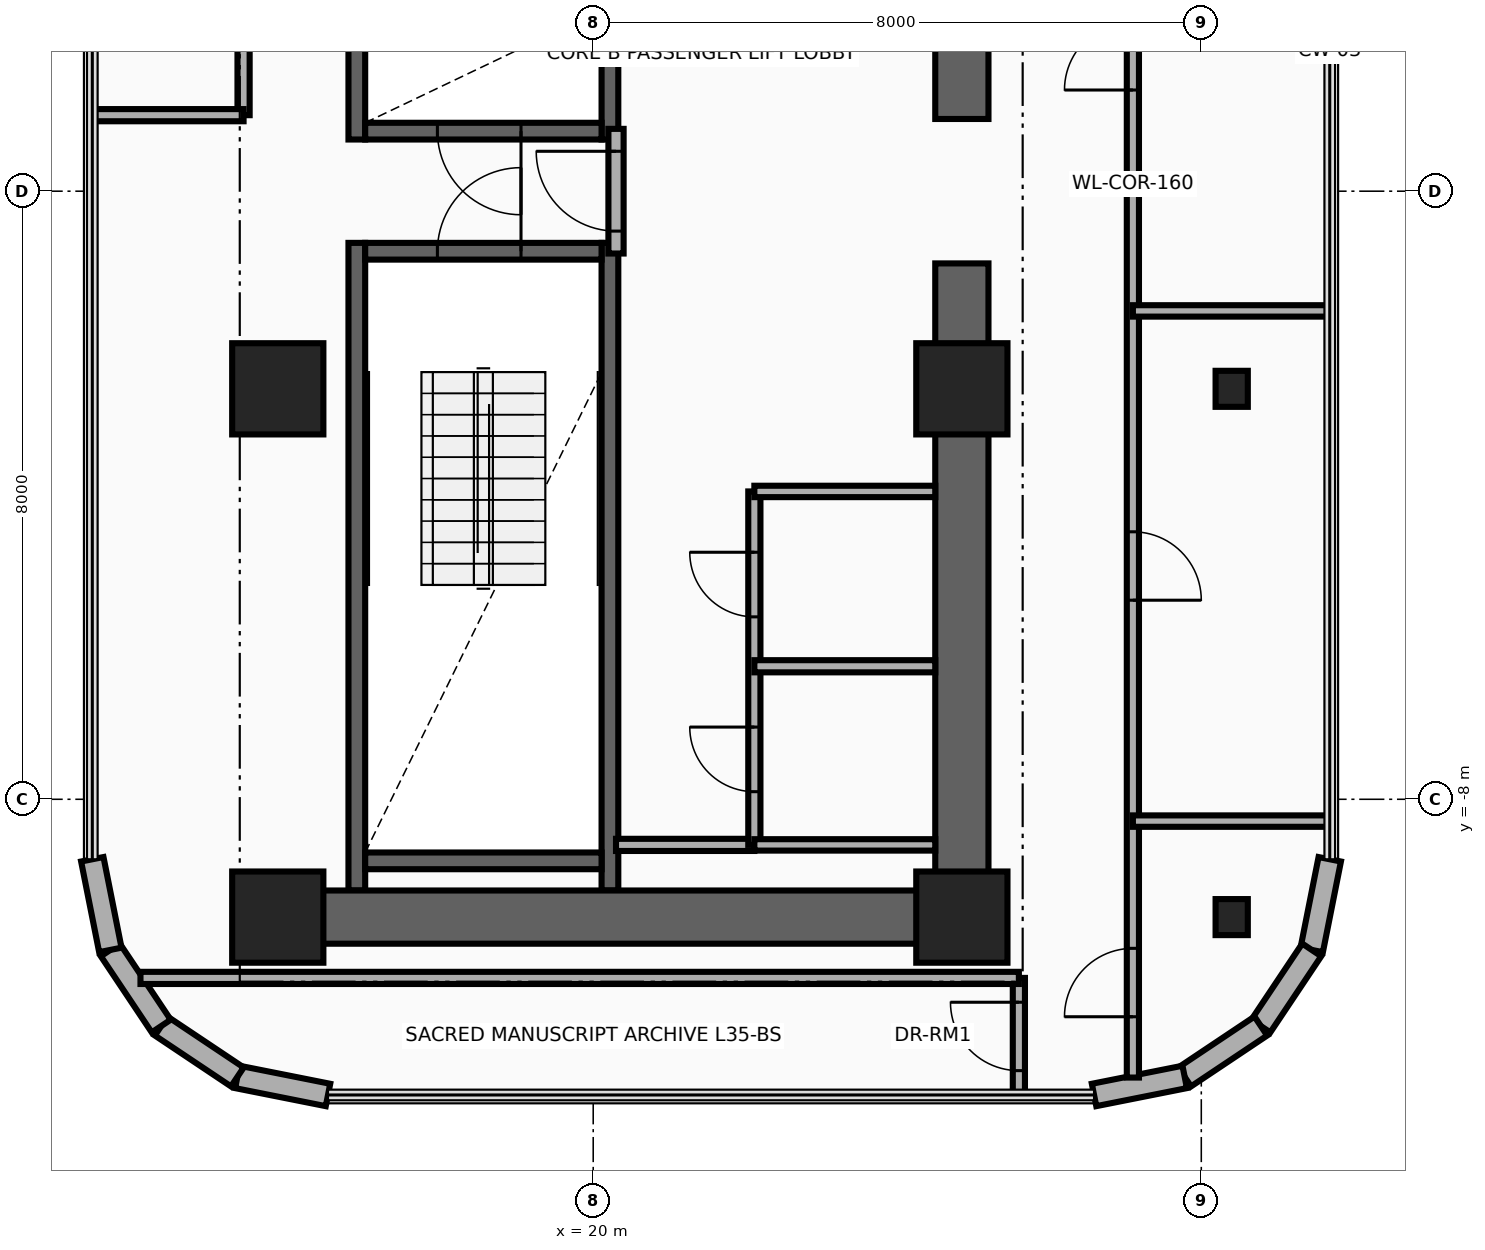
"""IFC4 building model, lengths in metres.
Left out: names, types, materials, properties, quantities, classifications, styles, units other than length and angle.
Written with IfcOpenShell. Run it as: python <this file> out.ifc"""

import sys

from ifc_helpers import new_model, si_unit, direction, frame, frame_2d, origin, origin_2d, place, context, subcontext, project, spatial, rectangle, i_section, extrude, source, transform, mapped, element, fill, save


model = new_model("IFC4")
c1 = context("Model", 3, precision=1e-05, world=origin(), true_north=direction((0.0, 1.0)))
c2 = subcontext(c1, "Body", "Model", "MODEL_VIEW")
j1 = project(units=[si_unit("LENGTHUNIT", "METRE"), si_unit("PLANEANGLEUNIT", "RADIAN")], contexts=[c1])
p1 = place(None, origin())
s1 = spatial("IfcSite", under=j1, at=p1, CompositionType="ELEMENT")
p2 = place(p1, origin())
s2 = spatial("IfcBuilding", under=s1, at=p2, CompositionType="ELEMENT")
p3 = place(p2, frame((0.0, 0.0, 139.0)))
s3 = spatial("IfcBuildingStorey", under=s2, at=p3, CompositionType="ELEMENT", Elevation=139.0)
for number, where, z_axis, x_axis in (
    (1, (16.89, 0.68, 0.0), (0.0, 0.0, 1.0), (0.0, 1.0, 0.0)),
    (2, (20.22, 0.68, 0.0), (0.0, 0.0, 1.0), (0.0, 1.0, 0.0)),
):
    element("IfcWall", number, at=place(p3, frame(where, z_axis=z_axis, x_axis=x_axis)), inside=s3, PredefinedType="SHEAR", context=c2, shape_type="SweptSolid", body=[
        extrude(rectangle(XDim=8.52, YDim=0.22, at=frame_2d((4.26, 0.0))), origin(), (0.0, 0.0, 1.0), 3.46),
    ])
p4 = place(p3, frame((17.0, 0.79, 0.0), z_axis=(0.0, 0.0, 1.0), x_axis=(1.0, 0.0, 0.0)))
e3 = element("IfcWall", 3, at=p4, inside=s3, PredefinedType="SHEAR", context=c2, shape_type="SweptSolid", body=[
    extrude(rectangle(XDim=3.11, YDim=0.22, at=frame_2d((1.555, 0.0))), origin(), (0.0, 0.0, 1.0), 3.46),
])
p5 = place(p4, frame((0.95, 0.0, 0.0)))
e4 = element("IfcOpeningElement", 4, at=p5, cuts=e3, PredefinedType="OPENING", context=c2, shape_type="SweptSolid", body=[
    extrude(rectangle(XDim=1.1, YDim=2.15, at=frame_2d((0.55, 1.075))), frame((0.0, 0.125, 0.0), z_axis=(0.0, -1.0, 0.0), x_axis=(1.0, 0.0, 0.0)), (0.0, 0.0, 1.0), 0.25),
])
for number, where, z_axis, x_axis in (
    (5, (16.89, -9.2, 0.0), (0.0, 0.0, 1.0), (0.0, 1.0, 0.0)),
    (6, (20.22, -9.2, 0.0), (0.0, 0.0, 1.0), (0.0, 1.0, 0.0)),
):
    element("IfcWall", number, at=place(p3, frame(where, z_axis=z_axis, x_axis=x_axis)), inside=s3, PredefinedType="SHEAR", context=c2, shape_type="SweptSolid", body=[
        extrude(rectangle(XDim=8.52, YDim=0.22, at=frame_2d((4.26, 0.0))), origin(), (0.0, 0.0, 1.0), 3.46),
    ])
p6 = place(p3, frame((17.0, -8.81, 0.0), z_axis=(0.0, 0.0, 1.0), x_axis=(1.0, 0.0, 0.0)))
e7 = element("IfcWall", 7, at=p6, inside=s3, PredefinedType="SHEAR", context=c2, shape_type="SweptSolid", body=[
    extrude(rectangle(XDim=3.11, YDim=0.22, at=frame_2d((1.555, 0.0))), origin(), (0.0, 0.0, 1.0), 3.46),
])
p7 = place(p3, frame((17.0, -0.79, 0.0), z_axis=(0.0, 0.0, 1.0), x_axis=(1.0, 0.0, 0.0)))
e8 = element("IfcWall", 8, at=p7, inside=s3, PredefinedType="SHEAR", context=c2, shape_type="SweptSolid", body=[
    extrude(rectangle(XDim=3.11, YDim=0.22, at=frame_2d((1.555, 0.0))), origin(), (0.0, 0.0, 1.0), 3.46),
])
p8 = place(p7, frame((0.95, 0.0, 0.0)))
e9 = element("IfcOpeningElement", 9, at=p8, cuts=e8, PredefinedType="OPENING", context=c2, shape_type="SweptSolid", body=[
    extrude(rectangle(XDim=1.1, YDim=2.15, at=frame_2d((0.55, 1.075))), frame((0.0, 0.125, 0.0), z_axis=(0.0, -1.0, 0.0), x_axis=(1.0, 0.0, 0.0)), (0.0, 0.0, 1.0), 0.25),
])
for number, where, z_axis, x_axis in (
    (10, (24.85, -9.9, 0.0), (0.0, 0.0, 1.0), (0.0, 1.0, 0.0)),
    (11, (24.85, 0.95, 0.0), (0.0, 0.0, 1.0), (0.0, 1.0, 0.0)),
):
    element("IfcWall", number, at=place(p3, frame(where, z_axis=z_axis, x_axis=x_axis)), inside=s3, PredefinedType="SHEAR", context=c2, shape_type="SweptSolid", body=[
        extrude(rectangle(XDim=8.95, YDim=0.7, at=frame_2d((4.475, 0.0))), origin(), (0.0, 0.0, 1.0), 3.46),
    ])
p9 = place(p3, frame((15.85, -9.55, 0.0), z_axis=(0.0, 0.0, 1.0), x_axis=(1.0, 0.0, 0.0)))
e12 = element("IfcWall", 12, at=p9, inside=s3, PredefinedType="SHEAR", context=c2, shape_type="SweptSolid", body=[
    extrude(rectangle(XDim=9.0, YDim=0.7, at=frame_2d((4.5, 0.0))), origin(), (0.0, 0.0, 1.0), 3.46),
])
m1 = source(origin(), c2, "Body", "SweptSolid", [
    extrude(rectangle(XDim=1.2, YDim=1.2, at=origin_2d()), origin(), (0.0, 0.0, 1.0), 3.7),
])
for number, where, z_axis, x_axis in (
    (13, (15.85, -9.55, 0.0), (0.0, 0.0, 1.0), (1.0, 0.0, 0.0)),
    (14, (24.85, -9.55, 0.0), (0.0, 0.0, 1.0), (1.0, 0.0, 0.0)),
):
    element("IfcColumn", number, at=place(p3, frame(where, z_axis=z_axis, x_axis=x_axis)), inside=s3, PredefinedType="COLUMN", context=c2, shape_type="MappedRepresentation", body=[
        mapped(m1, transform((0.0, 0.0, 0.0), x_axis=(1.0, 0.0, 0.0), y_axis=(0.0, 1.0, 0.0), z_axis=(0.0, 0.0, 1.0), scale=1.0)),
    ])
m2 = source(origin(), c2, "Body", "SweptSolid", [
    extrude(i_section(OverallWidth=0.424, OverallDepth=0.474, WebThickness=0.048, FlangeThickness=0.077, at=origin_2d()), origin(), (0.0, 0.0, 1.0), 3.7),
])
p10 = place(p3, frame((28.4, -9.55, 0.0), z_axis=(0.0, 0.0, 1.0), x_axis=(1.0, 0.0, 0.0)))
e15 = element("IfcColumn", 15, at=p10, inside=s3, PredefinedType="COLUMN", context=c2, shape_type="MappedRepresentation", body=[
    mapped(m2, transform((0.0, 0.0, 0.0), x_axis=(1.0, 0.0, 0.0), y_axis=(0.0, 1.0, 0.0), z_axis=(0.0, 0.0, 1.0), scale=1.0)),
])
for number, where, z_axis, x_axis in (
    (16, (15.85, -2.6, 0.0), (0.0, 0.0, 1.0), (1.0, 0.0, 0.0)),
    (17, (24.85, -2.6, 0.0), (0.0, 0.0, 1.0), (1.0, 0.0, 0.0)),
):
    element("IfcColumn", number, at=place(p3, frame(where, z_axis=z_axis, x_axis=x_axis)), inside=s3, PredefinedType="COLUMN", context=c2, shape_type="MappedRepresentation", body=[
        mapped(m1, transform((0.0, 0.0, 0.0), x_axis=(1.0, 0.0, 0.0), y_axis=(0.0, 1.0, 0.0), z_axis=(0.0, 0.0, 1.0), scale=1.0)),
    ])
p11 = place(p3, frame((28.4, -2.6, 0.0), z_axis=(0.0, 0.0, 1.0), x_axis=(1.0, 0.0, 0.0)))
e18 = element("IfcColumn", 18, at=p11, inside=s3, PredefinedType="COLUMN", context=c2, shape_type="MappedRepresentation", body=[
    mapped(m2, transform((0.0, 0.0, 0.0), x_axis=(1.0, 0.0, 0.0), y_axis=(0.0, 1.0, 0.0), z_axis=(0.0, 0.0, 1.0), scale=1.0)),
])
p12 = place(p3, frame((29.69, -8.789, 0.0), z_axis=(0.0, 0.0, 1.0), x_axis=(-0.194996050505, -0.980804027463, 0.0)))
e19 = element("IfcWall", 19, at=p12, inside=s3, PredefinedType="SOLIDWALL", context=c2, shape_type="SweptSolid", body=[
    extrude(rectangle(XDim=1.216, YDim=0.3, at=frame_2d((0.608, 0.0))), origin(), (0.0, 0.0, 1.0), 3.46),
])
for number, where, z_axis, x_axis in (
    (20, (29.453, -9.982, 0.0), (0.0, 0.0, 1.0), (-0.556, -0.831, 0.0)),
    (21, (28.783, -10.983, 0.0), (0.0, 0.0, 1.0), (-0.831, -0.556, 0.0)),
):
    element("IfcWall", number, at=place(p3, frame(where, z_axis=z_axis, x_axis=x_axis)), inside=s3, PredefinedType="SOLIDWALL", context=c2, shape_type="SweptSolid", body=[
        extrude(rectangle(XDim=1.205, YDim=0.3, at=frame_2d((0.603, 0.0))), origin(), (0.0, 0.0, 1.0), 3.46),
    ])
p13 = place(p3, frame((27.782, -11.653, 0.0), z_axis=(0.0, 0.0, 1.0), x_axis=(-0.980811661072, -0.194957650543, 0.0)))
e22 = element("IfcWall", 22, at=p13, inside=s3, PredefinedType="SOLIDWALL", context=c2, shape_type="SweptSolid", body=[
    extrude(rectangle(XDim=1.216, YDim=0.3, at=frame_2d((0.608, 0.0))), origin(), (0.0, 0.0, 1.0), 3.46),
])
p14 = place(p3, frame((16.511, -11.89, 0.0), z_axis=(0.0, 0.0, 1.0), x_axis=(-0.980804027463, 0.194996050505, 0.0)))
e23 = element("IfcWall", 23, at=p14, inside=s3, PredefinedType="SOLIDWALL", context=c2, shape_type="SweptSolid", body=[
    extrude(rectangle(XDim=1.216, YDim=0.3, at=frame_2d((0.608, 0.0))), origin(), (0.0, 0.0, 1.0), 3.46),
])
for number, where, z_axis, x_axis in (
    (24, (15.318, -11.653, 0.0), (0.0, 0.0, 1.0), (-0.831, 0.556, 0.0)),
    (25, (14.317, -10.983, 0.0), (0.0, 0.0, 1.0), (-0.556, 0.831, 0.0)),
):
    element("IfcWall", number, at=place(p3, frame(where, z_axis=z_axis, x_axis=x_axis)), inside=s3, PredefinedType="SOLIDWALL", context=c2, shape_type="SweptSolid", body=[
        extrude(rectangle(XDim=1.205, YDim=0.3, at=frame_2d((0.603, 0.0))), origin(), (0.0, 0.0, 1.0), 3.46),
    ])
p15 = place(p3, frame((13.647, -9.982, 0.0), z_axis=(0.0, 0.0, 1.0), x_axis=(-0.195189223115, 0.980765602568, 0.0)))
e26 = element("IfcWall", 26, at=p15, inside=s3, PredefinedType="SOLIDWALL", context=c2, shape_type="SweptSolid", body=[
    extrude(rectangle(XDim=1.216, YDim=0.3, at=frame_2d((0.608, 0.0))), origin(), (0.0, 0.0, 1.0), 3.46),
])
p16 = place(p3, frame((20.3, -0.82, 0.0), z_axis=(0.0, 0.0, 1.0), x_axis=(0.0, 1.0, 0.0)))
e27 = element("IfcWall", 27, at=p16, inside=s3, PredefinedType="PARTITIONING", context=c2, shape_type="SweptSolid", body=[
    extrude(rectangle(XDim=1.64, YDim=0.2, at=frame_2d((0.82, 0.0))), origin(), (0.0, 0.0, 1.0), 3.46),
])
p17 = place(p16, frame((0.295, 0.0, 0.0)))
e28 = element("IfcOpeningElement", 28, at=p17, cuts=e27, PredefinedType="OPENING", context=c2, shape_type="SweptSolid", body=[
    extrude(rectangle(XDim=1.05, YDim=2.15, at=frame_2d((0.525, 1.075))), frame((0.0, 0.115, 0.0), z_axis=(0.0, -1.0, 0.0), x_axis=(1.0, 0.0, 0.0)), (0.0, 0.0, 1.0), 0.23),
])
p18 = place(p3, frame((20.3, -8.6, 0.0), z_axis=(0.0, 0.0, 1.0), x_axis=(1.0, 0.0, 0.0)))
e29 = element("IfcWall", 29, at=p18, inside=s3, PredefinedType="PARTITIONING", context=c2, shape_type="SweptSolid", body=[
    extrude(rectangle(XDim=1.82, YDim=0.16, at=frame_2d((0.91, 0.0))), origin(), (0.0, 0.0, 1.0), 3.46),
])
p19 = place(p3, frame((22.12, -8.6, 0.0), z_axis=(0.0, 0.0, 1.0), x_axis=(0.0, 1.0, 0.0)))
e30 = element("IfcWall", 30, at=p19, inside=s3, PredefinedType="PARTITIONING", context=c2, shape_type="SweptSolid", body=[
    extrude(rectangle(XDim=4.65, YDim=0.16, at=frame_2d((2.325, 0.0))), origin(), (0.0, 0.0, 1.0), 3.46),
])
p20 = place(p19, frame((0.7, 0.0, 0.0)))
e31 = element("IfcOpeningElement", 31, at=p20, cuts=e30, PredefinedType="OPENING", context=c2, shape_type="SweptSolid", body=[
    extrude(rectangle(XDim=0.85, YDim=2.05, at=frame_2d((0.425, 1.025))), frame((0.0, 0.095, 0.0), z_axis=(0.0, -1.0, 0.0), x_axis=(1.0, 0.0, 0.0)), (0.0, 0.0, 1.0), 0.19),
])
p21 = place(p19, frame((3.0, 0.0, 0.0)))
e32 = element("IfcOpeningElement", 32, at=p21, cuts=e30, PredefinedType="OPENING", context=c2, shape_type="SweptSolid", body=[
    extrude(rectangle(XDim=0.85, YDim=2.05, at=frame_2d((0.425, 1.025))), frame((0.0, 0.095, 0.0), z_axis=(0.0, -1.0, 0.0), x_axis=(1.0, 0.0, 0.0)), (0.0, 0.0, 1.0), 0.19),
])
for number, where, z_axis, x_axis in (
    (33, (22.12, -3.95, 0.0), (0.0, 0.0, 1.0), (1.0, 0.0, 0.0)),
    (34, (22.12, -8.6, 0.0), (0.0, 0.0, 1.0), (1.0, 0.0, 0.0)),
):
    element("IfcWall", number, at=place(p3, frame(where, z_axis=z_axis, x_axis=x_axis)), inside=s3, PredefinedType="PARTITIONING", context=c2, shape_type="SweptSolid", body=[
        extrude(rectangle(XDim=2.38, YDim=0.15, at=frame_2d((1.19, 0.0))), origin(), (0.0, 0.0, 1.0), 3.46),
    ])
p22 = place(p3, frame((22.12, -6.25, 0.0), z_axis=(0.0, 0.0, 1.0), x_axis=(1.0, 0.0, 0.0)))
e35 = element("IfcWall", 35, at=p22, inside=s3, PredefinedType="PARTITIONING", context=c2, shape_type="SweptSolid", body=[
    extrude(rectangle(XDim=2.38, YDim=0.16, at=frame_2d((1.19, 0.0))), origin(), (0.0, 0.0, 1.0), 3.46),
])
p23 = place(p3, frame((25.6, -11.89, 0.0), z_axis=(0.0, 0.0, 1.0), x_axis=(0.0, 1.0, 0.0)))
e36 = element("IfcWall", 36, at=p23, inside=s3, PredefinedType="PARTITIONING", context=c2, shape_type="SweptSolid", body=[
    extrude(rectangle(XDim=1.54, YDim=0.16, at=frame_2d((0.77, 0.0))), origin(), (0.0, 0.0, 1.0), 3.46),
])
p24 = place(p23, frame((0.32, 0.0, 0.0)))
e37 = element("IfcOpeningElement", 37, at=p24, cuts=e36, PredefinedType="OPENING", context=c2, shape_type="SweptSolid", body=[
    extrude(rectangle(XDim=0.9, YDim=2.1, at=frame_2d((0.45, 1.05))), frame((0.0, 0.095, 0.0), z_axis=(0.0, -1.0, 0.0), x_axis=(1.0, 0.0, 0.0)), (0.0, 0.0, 1.0), 0.19),
])
p25 = place(p3, frame((14.044, -10.35, 0.0), z_axis=(0.0, 0.0, 1.0), x_axis=(1.0, 0.0, 0.0)))
e38 = element("IfcWall", 38, at=p25, inside=s3, PredefinedType="PARTITIONING", context=c2, shape_type="SweptSolid", body=[
    extrude(rectangle(XDim=11.556, YDim=0.16, at=frame_2d((5.778, 0.0))), origin(), (0.0, 0.0, 1.0), 3.46),
])
p26 = place(p3, frame((27.1, -11.661, 0.0), z_axis=(0.0, 0.0, 1.0), x_axis=(0.0, 1.0, 0.0)))
e39 = element("IfcWall", 39, at=p26, inside=s3, PredefinedType="PARTITIONING", context=c2, shape_type="SweptSolid", body=[
    extrude(rectangle(XDim=23.511, YDim=0.16, at=frame_2d((11.755, 0.0))), origin(), (0.0, 0.0, 1.0), 2.666),
])
p27 = place(p26, frame((0.8, 0.0, 0.0)))
e40 = element("IfcOpeningElement", 40, at=p27, cuts=e39, PredefinedType="OPENING", context=c2, shape_type="SweptSolid", body=[
    extrude(rectangle(XDim=0.9, YDim=2.1, at=frame_2d((0.45, 1.05))), frame((0.0, 0.095, 0.0), z_axis=(0.0, -1.0, 0.0), x_axis=(1.0, 0.0, 0.0)), (0.0, 0.0, 1.0), 0.19),
])
p28 = place(p26, frame((6.28, 0.0, 0.0)))
e41 = element("IfcOpeningElement", 41, at=p28, cuts=e39, PredefinedType="OPENING", context=c2, shape_type="SweptSolid", body=[
    extrude(rectangle(XDim=0.9, YDim=2.1, at=frame_2d((0.45, 1.05))), frame((0.0, 0.095, 0.0), z_axis=(0.0, -1.0, 0.0), x_axis=(1.0, 0.0, 0.0)), (0.0, 0.0, 1.0), 0.19),
])
p29 = place(p26, frame((12.992, 0.0, 0.0)))
e42 = element("IfcOpeningElement", 42, at=p29, cuts=e39, PredefinedType="OPENING", context=c2, shape_type="SweptSolid", body=[
    extrude(rectangle(XDim=0.9, YDim=2.1, at=frame_2d((0.45, 1.05))), frame((0.0, 0.095, 0.0), z_axis=(0.0, -1.0, 0.0), x_axis=(1.0, 0.0, 0.0)), (0.0, 0.0, 1.0), 0.19),
])
p30 = place(p26, frame((19.705, 0.0, 0.0)))
e43 = element("IfcOpeningElement", 43, at=p30, cuts=e39, PredefinedType="OPENING", context=c2, shape_type="SweptSolid", body=[
    extrude(rectangle(XDim=0.9, YDim=2.1, at=frame_2d((0.45, 1.05))), frame((0.0, 0.095, 0.0), z_axis=(0.0, -1.0, 0.0), x_axis=(1.0, 0.0, 0.0)), (0.0, 0.0, 1.0), 0.19),
])
for number, where, z_axis, x_axis in (
    (44, (27.1, -8.287, 0.0), (0.0, 0.0, 1.0), (1.0, 0.0, 0.0)),
    (45, (27.1, -1.575, 0.0), (0.0, 0.0, 1.0), (1.0, 0.0, 0.0)),
):
    element("IfcWall", number, at=place(p3, frame(where, z_axis=z_axis, x_axis=x_axis)), inside=s3, PredefinedType="PARTITIONING", context=c2, shape_type="SweptSolid", body=[
        extrude(rectangle(XDim=2.59, YDim=0.15, at=frame_2d((1.295, 0.0))), origin(), (0.0, 0.0, 1.0), 2.896),
    ])
p31 = place(p3, frame((15.4, 1.0, 0.0), z_axis=(0.0, 0.0, 1.0), x_axis=(0.0, 1.0, 0.0)))
e46 = element("IfcWall", 46, at=p31, inside=s3, PredefinedType="PARTITIONING", context=c2, shape_type="SweptSolid", body=[
    extrude(rectangle(XDim=9.35, YDim=0.16, at=frame_2d((4.675, 0.0))), origin(), (0.0, 0.0, 1.0), 2.245),
])
p32 = place(p3, frame((13.41, 1.0, 0.0), z_axis=(0.0, 0.0, 1.0), x_axis=(1.0, 0.0, 0.0)))
e47 = element("IfcWall", 47, at=p32, inside=s3, PredefinedType="PARTITIONING", context=c2, shape_type="SweptSolid", body=[
    extrude(rectangle(XDim=1.99, YDim=0.16, at=frame_2d((0.995, 0.0))), origin(), (0.0, 0.0, 1.0), 2.245),
])
p33 = place(p17, origin())
e48 = element("IfcDoor", 48, at=p33, inside=s3, OperationType="SINGLE_SWING_RIGHT", PredefinedType="DOOR", context=c2, shape_type="SweptSolid", body=[
    extrude(rectangle(XDim=1.05, YDim=2.15, at=frame_2d((0.525, 1.075))), frame((0.0, 0.025, 0.0), z_axis=(0.0, -1.0, 0.0), x_axis=(1.0, 0.0, 0.0)), (0.0, 0.0, 1.0), 0.05),
])
fill(e28, e48)
p34 = place(p5, frame((1.1, 0.0, 0.0), z_axis=(0.0, 0.0, 1.0), x_axis=(-1.0, 0.0, 0.0)))
e49 = element("IfcDoor", 49, at=p34, inside=s3, OperationType="SINGLE_SWING_LEFT", PredefinedType="DOOR", context=c2, shape_type="SweptSolid", body=[
    extrude(rectangle(XDim=1.1, YDim=2.15, at=frame_2d((0.55, 1.075))), frame((0.0, 0.025, 0.0), z_axis=(0.0, -1.0, 0.0), x_axis=(1.0, 0.0, 0.0)), (0.0, 0.0, 1.0), 0.05),
])
fill(e4, e49)
p35 = place(p8, origin())
e50 = element("IfcDoor", 50, at=p35, inside=s3, OperationType="SINGLE_SWING_RIGHT", PredefinedType="DOOR", context=c2, shape_type="SweptSolid", body=[
    extrude(rectangle(XDim=1.1, YDim=2.15, at=frame_2d((0.55, 1.075))), frame((0.0, 0.025, 0.0), z_axis=(0.0, -1.0, 0.0), x_axis=(1.0, 0.0, 0.0)), (0.0, 0.0, 1.0), 0.05),
])
fill(e9, e50)
p36 = place(p20, origin())
e51 = element("IfcDoor", 51, at=p36, inside=s3, OperationType="SINGLE_SWING_RIGHT", PredefinedType="DOOR", context=c2, shape_type="SweptSolid", body=[
    extrude(rectangle(XDim=0.85, YDim=2.05, at=frame_2d((0.425, 1.025))), frame((0.0, 0.025, 0.0), z_axis=(0.0, -1.0, 0.0), x_axis=(1.0, 0.0, 0.0)), (0.0, 0.0, 1.0), 0.05),
])
fill(e31, e51)
p37 = place(p21, origin())
e52 = element("IfcDoor", 52, at=p37, inside=s3, OperationType="SINGLE_SWING_LEFT", PredefinedType="DOOR", context=c2, shape_type="SweptSolid", body=[
    extrude(rectangle(XDim=0.85, YDim=2.05, at=frame_2d((0.425, 1.025))), frame((0.0, 0.025, 0.0), z_axis=(0.0, -1.0, 0.0), x_axis=(1.0, 0.0, 0.0)), (0.0, 0.0, 1.0), 0.05),
])
fill(e32, e52)
p38 = place(p24, origin())
e53 = element("IfcDoor", 53, at=p38, inside=s3, OperationType="SINGLE_SWING_RIGHT", PredefinedType="DOOR", context=c2, shape_type="SweptSolid", body=[
    extrude(rectangle(XDim=0.9, YDim=2.1, at=frame_2d((0.45, 1.05))), frame((0.0, 0.025, 0.0), z_axis=(0.0, -1.0, 0.0), x_axis=(1.0, 0.0, 0.0)), (0.0, 0.0, 1.0), 0.05),
])
fill(e37, e53)
p39 = place(p27, origin())
e54 = element("IfcDoor", 54, at=p39, inside=s3, OperationType="SINGLE_SWING_RIGHT", PredefinedType="DOOR", context=c2, shape_type="SweptSolid", body=[
    extrude(rectangle(XDim=0.9, YDim=2.1, at=frame_2d((0.45, 1.05))), frame((0.0, 0.025, 0.0), z_axis=(0.0, -1.0, 0.0), x_axis=(1.0, 0.0, 0.0)), (0.0, 0.0, 1.0), 0.05),
])
fill(e40, e54)
p40 = place(p28, frame((0.9, 0.0, 0.0), z_axis=(0.0, 0.0, 1.0), x_axis=(-1.0, 0.0, 0.0)))
e55 = element("IfcDoor", 55, at=p40, inside=s3, OperationType="SINGLE_SWING_LEFT", PredefinedType="DOOR", context=c2, shape_type="SweptSolid", body=[
    extrude(rectangle(XDim=0.9, YDim=2.1, at=frame_2d((0.45, 1.05))), frame((0.0, 0.025, 0.0), z_axis=(0.0, -1.0, 0.0), x_axis=(1.0, 0.0, 0.0)), (0.0, 0.0, 1.0), 0.05),
])
fill(e41, e55)
p41 = place(p29, origin())
e56 = element("IfcDoor", 56, at=p41, inside=s3, OperationType="SINGLE_SWING_RIGHT", PredefinedType="DOOR", context=c2, shape_type="SweptSolid", body=[
    extrude(rectangle(XDim=0.9, YDim=2.1, at=frame_2d((0.45, 1.05))), frame((0.0, 0.025, 0.0), z_axis=(0.0, -1.0, 0.0), x_axis=(1.0, 0.0, 0.0)), (0.0, 0.0, 1.0), 0.05),
])
fill(e42, e56)
save(model, sys.argv[1])
